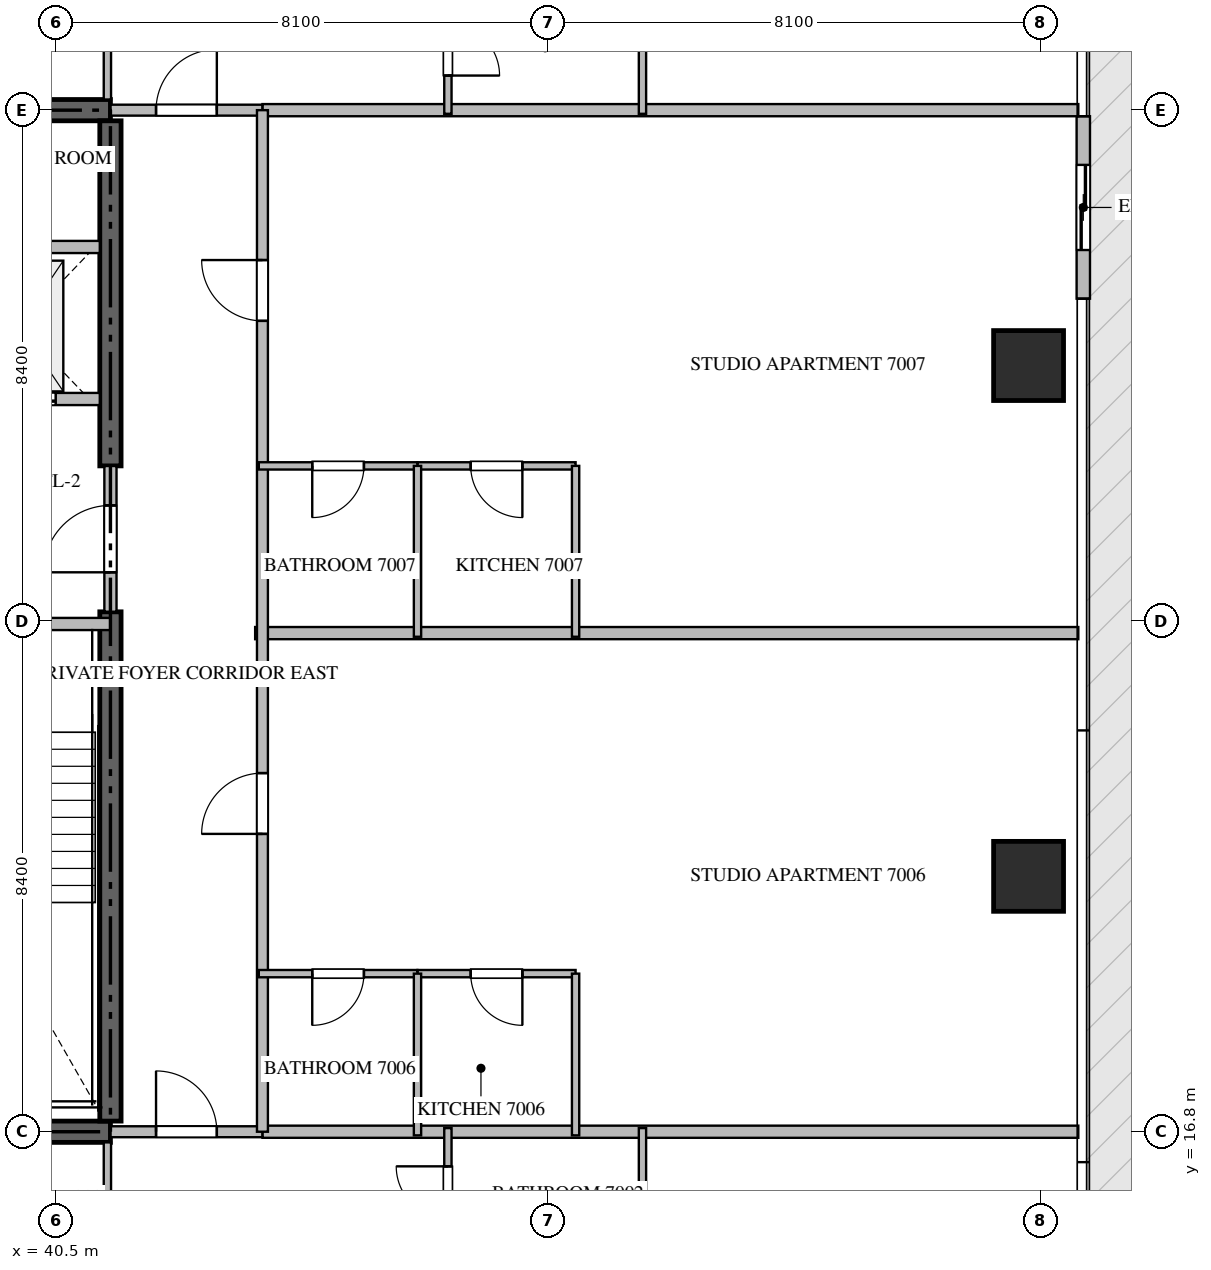
"""IFC4 building model, lengths in metres.
Left out: names, types, materials, properties, quantities, classifications, styles, units other than length and angle.
Written with IfcOpenShell. Run it as: python <this file> out.ifc"""

import sys

from ifc_helpers import new_model, si_unit, direction, frame, frame_2d, origin, origin_2d, place, context, subcontext, project, spatial, rectangle, extrude, source, transform, mapped, element, fill, save


model = new_model("IFC4")
c1 = context("Model", 3, precision=1e-05, world=origin(), true_north=direction((0.0, 1.0)))
c2 = subcontext(c1, "Body", "Model", "MODEL_VIEW")
j1 = project(units=[si_unit("LENGTHUNIT", "METRE"), si_unit("PLANEANGLEUNIT", "RADIAN")], contexts=[c1])
p1 = place(None, origin())
s1 = spatial("IfcSite", under=j1, at=p1, CompositionType="ELEMENT")
p2 = place(p1, origin())
s2 = spatial("IfcBuilding", under=s1, at=p2, CompositionType="ELEMENT")
p3 = place(p2, frame((0.0, 0.0, 279.75)))
s3 = spatial("IfcBuildingStorey", under=s2, at=p3, CompositionType="ELEMENT", Elevation=279.75)
for number, where, z_axis, x_axis in (
    (1, (23.4, 16.8, -0.26), (0.0, 0.0, 1.0), (1.0, 0.0, 0.0)),
    (2, (41.4, 33.6, -0.26), (0.0, 0.0, 1.0), (-1.0, 0.0, 0.0)),
):
    element("IfcWall", number, at=place(p3, frame(where, z_axis=z_axis, x_axis=x_axis)), inside=s3, PredefinedType="SHEAR", context=c2, shape_type="SweptSolid", body=[
        extrude(rectangle(XDim=18.0, YDim=0.35, at=frame_2d((9.0, 0.0))), origin(), (0.0, 0.0, 1.0), 3.848),
    ])
p4 = place(p3, frame((41.4, 16.975, -0.26), z_axis=(0.0, 0.0, 1.0), x_axis=(0.0, 1.0, 0.0)))
e3 = element("IfcWall", 3, at=p4, inside=s3, PredefinedType="SHEAR", context=c2, shape_type="SweptSolid", body=[
    extrude(rectangle(XDim=8.375, YDim=0.35, at=frame_2d((4.188, 0.0))), origin(), (0.0, 0.0, 1.0), 3.848),
])
p5 = place(p3, frame((41.4, 27.75, -0.26), z_axis=(0.0, 0.0, 1.0), x_axis=(0.0, 1.0, 0.0)))
e4 = element("IfcWall", 4, at=p5, inside=s3, PredefinedType="SHEAR", context=c2, shape_type="SweptSolid", body=[
    extrude(rectangle(XDim=5.675, YDim=0.35, at=frame_2d((2.837, 0.0))), origin(), (0.0, 0.0, 1.0), 3.848),
])
m1 = source(origin(), c2, "Body", "SweptSolid", [
    extrude(rectangle(XDim=1.15, YDim=1.15, at=origin_2d()), origin(), (0.0, 0.0, 1.0), 3.85),
])
for number, where, z_axis, x_axis in (
    (5, (56.5, 21.0, -0.26), (0.0, 0.0, 1.0), (1.0, 0.0, 0.0)),
    (6, (56.5, 29.4, -0.26), (0.0, 0.0, 1.0), (1.0, 0.0, 0.0)),
):
    element("IfcColumn", number, at=place(p3, frame(where, z_axis=z_axis, x_axis=x_axis)), inside=s3, PredefinedType="COLUMN", context=c2, shape_type="MappedRepresentation", body=[
        mapped(m1, transform((0.0, 0.0, 0.0), scale=1.0)),
    ])
p6 = place(p3, frame((57.4, 30.5, 0.0), z_axis=(0.0, 0.0, 1.0), x_axis=(0.0, 1.0, 0.0)))
e7 = element("IfcWall", 7, at=p6, inside=s3, PredefinedType="ELEMENTEDWALL", context=c2, shape_type="SweptSolid", body=[
    extrude(rectangle(XDim=3.0, YDim=0.22, at=frame_2d((1.5, 0.0))), origin(), (0.0, 0.0, 1.0), 3.575),
])
p7 = place(p6, frame((0.8, 0.0, 0.0)))
e8 = element("IfcOpeningElement", 8, at=p7, cuts=e7, PredefinedType="OPENING", context=c2, shape_type="SweptSolid", body=[
    extrude(rectangle(XDim=1.4, YDim=2.25, at=frame_2d((0.7, 1.125))), frame((0.0, 0.12, 0.0), z_axis=(0.0, -1.0, 0.0), x_axis=(1.0, 0.0, 0.0)), (0.0, 0.0, 1.0), 0.24),
])
p8 = place(p3, frame((36.95, 25.15, 0.0), z_axis=(0.0, 0.0, 1.0), x_axis=(1.0, 0.0, 0.0)))
e9 = element("IfcWall", 9, at=p8, inside=s3, PredefinedType="STANDARD", context=c2, shape_type="SweptSolid", body=[
    extrude(rectangle(XDim=4.45, YDim=0.2, at=frame_2d((2.225, 0.0))), origin(), (0.0, 0.0, 1.0), 3.59),
])
p9 = place(p8, frame((1.65, 0.0, 0.0)))
e10 = element("IfcOpeningElement", 10, at=p9, cuts=e9, PredefinedType="OPENING", context=c2, shape_type="SweptSolid", body=[
    extrude(rectangle(XDim=1.1, YDim=2.15, at=frame_2d((0.55, 1.075))), frame((0.0, 0.11, 0.0), z_axis=(0.0, -1.0, 0.0), x_axis=(1.0, 0.0, 0.0)), (0.0, 0.0, 1.0), 0.22),
])
p10 = place(p3, frame((38.75, 28.85, 0.0), z_axis=(0.0, 0.0, 1.0), x_axis=(1.0, 0.0, 0.0)))
e11 = element("IfcWall", 11, at=p10, inside=s3, PredefinedType="STANDARD", context=c2, shape_type="SweptSolid", body=[
    extrude(rectangle(XDim=2.475, YDim=0.2, at=frame_2d((1.238, 0.0))), origin(), (0.0, 0.0, 1.0), 3.59),
])
p11 = place(p10, frame((0.55, 0.0, 0.0)))
e12 = element("IfcOpeningElement", 12, at=p11, cuts=e11, PredefinedType="OPENING", context=c2, shape_type="SweptSolid", body=[
    extrude(rectangle(XDim=1.2, YDim=2.2, at=frame_2d((0.6, 1.1))), frame((0.0, 0.11, 0.0), z_axis=(0.0, -1.0, 0.0), x_axis=(1.0, 0.0, 0.0)), (0.0, 0.0, 1.0), 0.22),
])
p12 = place(p3, frame((38.75, 31.35, 0.0), z_axis=(0.0, 0.0, 1.0), x_axis=(1.0, 0.0, 0.0)))
e13 = element("IfcWall", 13, at=p12, inside=s3, PredefinedType="STANDARD", context=c2, shape_type="SweptSolid", body=[
    extrude(rectangle(XDim=2.475, YDim=0.2, at=frame_2d((1.238, 0.0))), origin(), (0.0, 0.0, 1.0), 3.59),
])
p13 = place(p3, frame((41.4, 25.352, 0.0), z_axis=(0.0, 0.0, 1.0), x_axis=(0.0, 1.0, 0.0)))
e14 = element("IfcWall", 14, at=p13, inside=s3, PredefinedType="STANDARD", context=c2, shape_type="SweptSolid", body=[
    extrude(rectangle(XDim=2.396, YDim=0.2, at=frame_2d((1.198, 0.0))), origin(), (0.0, 0.0, 1.0), 3.59),
])
p14 = place(p13, frame((0.648, 0.0, 0.0)))
e15 = element("IfcOpeningElement", 15, at=p14, cuts=e14, PredefinedType="OPENING", context=c2, shape_type="SweptSolid", body=[
    extrude(rectangle(XDim=1.1, YDim=2.15, at=frame_2d((0.55, 1.075))), frame((0.0, 0.11, 0.0), z_axis=(0.0, -1.0, 0.0), x_axis=(1.0, 0.0, 0.0)), (0.0, 0.0, 1.0), 0.22),
])
p15 = place(p3, frame((43.78, 25.0, 0.0), z_axis=(0.0, 0.0, 1.0), x_axis=(1.0, 0.0, 0.0)))
e16 = element("IfcWall", 16, at=p15, inside=s3, PredefinedType="PARTITIONING", context=c2, shape_type="SweptSolid", body=[
    extrude(rectangle(XDim=13.538, YDim=0.2, at=frame_2d((6.769, 0.0))), origin(), (0.0, 0.0, 1.0), 3.59),
])
for number, where, z_axis, x_axis in (
    (17, (43.9, 16.8, 0.0), (0.0, 0.0, 1.0), (1.0, 0.0, 0.0)),
    (18, (43.9, 33.6, 0.0), (0.0, 0.0, 1.0), (1.0, 0.0, 0.0)),
):
    element("IfcWall", number, at=place(p3, frame(where, z_axis=z_axis, x_axis=x_axis)), inside=s3, PredefinedType="PARTITIONING", context=c2, shape_type="SweptSolid", body=[
        extrude(rectangle(XDim=13.418, YDim=0.2, at=frame_2d((6.709, 0.0))), origin(), (0.0, 0.0, 1.0), 3.59),
    ])
p16 = place(p3, frame((41.402, 16.8, 0.0), z_axis=(0.0, 0.0, 1.0), x_axis=(1.0, 0.0, 0.0)))
e19 = element("IfcWall", 19, at=p16, inside=s3, PredefinedType="PARTITIONING", context=c2, shape_type="SweptSolid", body=[
    extrude(rectangle(XDim=2.496, YDim=0.18, at=frame_2d((1.248, 0.0))), origin(), (0.0, 0.0, 1.0), 3.59),
])
p17 = place(p16, frame((0.748, 0.0, 0.0)))
e20 = element("IfcOpeningElement", 20, at=p17, cuts=e19, PredefinedType="OPENING", context=c2, shape_type="SweptSolid", body=[
    extrude(rectangle(XDim=1.0, YDim=2.15, at=frame_2d((0.5, 1.075))), frame((0.0, 0.1, 0.0), z_axis=(0.0, -1.0, 0.0), x_axis=(1.0, 0.0, 0.0)), (0.0, 0.0, 1.0), 0.2),
])
p18 = place(p3, frame((41.402, 33.6, 0.0), z_axis=(0.0, 0.0, 1.0), x_axis=(1.0, 0.0, 0.0)))
e21 = element("IfcWall", 21, at=p18, inside=s3, PredefinedType="PARTITIONING", context=c2, shape_type="SweptSolid", body=[
    extrude(rectangle(XDim=2.496, YDim=0.18, at=frame_2d((1.248, 0.0))), origin(), (0.0, 0.0, 1.0), 3.59),
])
p19 = place(p18, frame((0.748, 0.0, 0.0)))
e22 = element("IfcOpeningElement", 22, at=p19, cuts=e21, PredefinedType="OPENING", context=c2, shape_type="SweptSolid", body=[
    extrude(rectangle(XDim=1.0, YDim=2.15, at=frame_2d((0.5, 1.075))), frame((0.0, 0.1, 0.0), z_axis=(0.0, -1.0, 0.0), x_axis=(1.0, 0.0, 0.0)), (0.0, 0.0, 1.0), 0.2),
])
p20 = place(p3, frame((43.9, 16.8, 0.0), z_axis=(0.0, 0.0, 1.0), x_axis=(0.0, 1.0, 0.0)))
e23 = element("IfcWall", 23, at=p20, inside=s3, PredefinedType="PARTITIONING", context=c2, shape_type="SweptSolid", body=[
    extrude(rectangle(XDim=16.8, YDim=0.18, at=frame_2d((8.4, 0.0))), origin(), (0.0, 0.0, 1.0), 3.59),
])
p21 = place(p20, frame((4.898, 0.0, 0.0)))
e24 = element("IfcOpeningElement", 24, at=p21, cuts=e23, PredefinedType="OPENING", context=c2, shape_type="SweptSolid", body=[
    extrude(rectangle(XDim=1.0, YDim=2.15, at=frame_2d((0.5, 1.075))), frame((0.0, 0.1, 0.0), z_axis=(0.0, -1.0, 0.0), x_axis=(1.0, 0.0, 0.0)), (0.0, 0.0, 1.0), 0.2),
])
p22 = place(p20, frame((13.335, 0.0, 0.0)))
e25 = element("IfcOpeningElement", 25, at=p22, cuts=e23, PredefinedType="OPENING", context=c2, shape_type="SweptSolid", body=[
    extrude(rectangle(XDim=1.0, YDim=2.15, at=frame_2d((0.5, 1.075))), frame((0.0, 0.1, 0.0), z_axis=(0.0, -1.0, 0.0), x_axis=(1.0, 0.0, 0.0)), (0.0, 0.0, 1.0), 0.2),
])
p23 = place(p3, frame((41.35, 14.05, 0.0), z_axis=(0.0, 0.0, 1.0), x_axis=(0.0, 1.0, 0.0)))
e26 = element("IfcWall", 26, at=p23, inside=s3, PredefinedType="PARTITIONING", context=c2, shape_type="SweptSolid", body=[
    extrude(rectangle(XDim=2.575, YDim=0.12, at=frame_2d((1.288, 0.0))), origin(), (0.0, 0.0, 1.0), 3.59),
])
p24 = place(p3, frame((50.15, 14.75, 0.0), z_axis=(0.0, 0.0, 1.0), x_axis=(0.0, 1.0, 0.0)))
e27 = element("IfcWall", 27, at=p24, inside=s3, PredefinedType="PARTITIONING", context=c2, shape_type="SweptSolid", body=[
    extrude(rectangle(XDim=2.11, YDim=0.12, at=frame_2d((1.055, 0.0))), origin(), (0.0, 0.0, 1.0), 3.59),
])
p25 = place(p3, frame((46.95, 14.752, 0.0), z_axis=(0.0, 0.0, 1.0), x_axis=(0.0, 1.0, 0.0)))
e28 = element("IfcWall", 28, at=p25, inside=s3, PredefinedType="PARTITIONING", context=c2, shape_type="SweptSolid", body=[
    extrude(rectangle(XDim=2.108, YDim=0.12, at=frame_2d((1.054, 0.0))), origin(), (0.0, 0.0, 1.0), 3.59),
])
p26 = place(p25, frame((0.629, 0.0, 0.0)))
e29 = element("IfcOpeningElement", 29, at=p26, cuts=e28, PredefinedType="OPENING", context=c2, shape_type="SweptSolid", body=[
    extrude(rectangle(XDim=0.85, YDim=2.1, at=frame_2d((0.425, 1.05))), frame((0.0, 0.07, 0.0), z_axis=(0.0, -1.0, 0.0), x_axis=(1.0, 0.0, 0.0)), (0.0, 0.0, 1.0), 0.14),
])
p27 = place(p3, frame((41.35, 36.35, 0.0), z_axis=(0.0, 0.0, 1.0), x_axis=(0.0, -1.0, 0.0)))
e30 = element("IfcWall", 30, at=p27, inside=s3, PredefinedType="PARTITIONING", context=c2, shape_type="SweptSolid", body=[
    extrude(rectangle(XDim=2.575, YDim=0.12, at=frame_2d((1.288, 0.0))), origin(), (0.0, 0.0, 1.0), 3.59),
])
p28 = place(p3, frame((50.15, 35.65, 0.0), z_axis=(0.0, 0.0, 1.0), x_axis=(0.0, -1.0, 0.0)))
e31 = element("IfcWall", 31, at=p28, inside=s3, PredefinedType="PARTITIONING", context=c2, shape_type="SweptSolid", body=[
    extrude(rectangle(XDim=2.11, YDim=0.12, at=frame_2d((1.055, 0.0))), origin(), (0.0, 0.0, 1.0), 3.59),
])
p29 = place(p3, frame((46.95, 35.648, 0.0), z_axis=(0.0, 0.0, 1.0), x_axis=(0.0, -1.0, 0.0)))
e32 = element("IfcWall", 32, at=p29, inside=s3, PredefinedType="PARTITIONING", context=c2, shape_type="SweptSolid", body=[
    extrude(rectangle(XDim=2.108, YDim=0.12, at=frame_2d((1.054, 0.0))), origin(), (0.0, 0.0, 1.0), 3.59),
])
p30 = place(p29, frame((0.629, 0.0, 0.0)))
e33 = element("IfcOpeningElement", 33, at=p30, cuts=e32, PredefinedType="OPENING", context=c2, shape_type="SweptSolid", body=[
    extrude(rectangle(XDim=0.85, YDim=2.1, at=frame_2d((0.425, 1.05))), frame((0.0, 0.07, 0.0), z_axis=(0.0, -1.0, 0.0), x_axis=(1.0, 0.0, 0.0)), (0.0, 0.0, 1.0), 0.14),
])
p31 = place(p3, frame((49.05, 19.4, 0.0), z_axis=(0.0, 0.0, 1.0), x_axis=(-1.0, 0.0, 0.0)))
e34 = element("IfcWall", 34, at=p31, inside=s3, PredefinedType="PARTITIONING", context=c2, shape_type="SweptSolid", body=[
    extrude(rectangle(XDim=2.6, YDim=0.12, at=frame_2d((1.3, 0.0))), origin(), (0.0, 0.0, 1.0), 3.59),
])
p32 = place(p31, frame((0.875, 0.0, 0.0)))
e35 = element("IfcOpeningElement", 35, at=p32, cuts=e34, PredefinedType="OPENING", context=c2, shape_type="SweptSolid", body=[
    extrude(rectangle(XDim=0.85, YDim=2.1, at=frame_2d((0.425, 1.05))), frame((0.0, 0.07, 0.0), z_axis=(0.0, -1.0, 0.0), x_axis=(1.0, 0.0, 0.0)), (0.0, 0.0, 1.0), 0.14),
])
p33 = place(p3, frame((46.448, 19.4, 0.0), z_axis=(0.0, 0.0, 1.0), x_axis=(-1.0, 0.0, 0.0)))
e36 = element("IfcWall", 36, at=p33, inside=s3, PredefinedType="PARTITIONING", context=c2, shape_type="SweptSolid", body=[
    extrude(rectangle(XDim=2.608, YDim=0.12, at=frame_2d((1.304, 0.0))), origin(), (0.0, 0.0, 1.0), 3.59),
])
p34 = place(p33, frame((0.879, 0.0, 0.0)))
e37 = element("IfcOpeningElement", 37, at=p34, cuts=e36, PredefinedType="OPENING", context=c2, shape_type="SweptSolid", body=[
    extrude(rectangle(XDim=0.85, YDim=2.1, at=frame_2d((0.425, 1.05))), frame((0.0, 0.07, 0.0), z_axis=(0.0, -1.0, 0.0), x_axis=(1.0, 0.0, 0.0)), (0.0, 0.0, 1.0), 0.14),
])
for number, where, z_axis, x_axis in (
    (38, (46.45, 16.74, 0.0), (0.0, 0.0, 1.0), (0.0, 1.0, 0.0)),
    (39, (49.05, 16.74, 0.0), (0.0, 0.0, 1.0), (0.0, 1.0, 0.0)),
):
    element("IfcWall", number, at=place(p3, frame(where, z_axis=z_axis, x_axis=x_axis)), inside=s3, PredefinedType="PARTITIONING", context=c2, shape_type="SweptSolid", body=[
        extrude(rectangle(XDim=2.66, YDim=0.12, at=frame_2d((1.33, 0.0))), origin(), (0.0, 0.0, 1.0), 3.59),
    ])
p35 = place(p3, frame((49.05, 27.75, 0.0), z_axis=(0.0, 0.0, 1.0), x_axis=(-1.0, 0.0, 0.0)))
e40 = element("IfcWall", 40, at=p35, inside=s3, PredefinedType="PARTITIONING", context=c2, shape_type="SweptSolid", body=[
    extrude(rectangle(XDim=2.6, YDim=0.12, at=frame_2d((1.3, 0.0))), origin(), (0.0, 0.0, 1.0), 3.59),
])
p36 = place(p35, frame((0.875, 0.0, 0.0)))
e41 = element("IfcOpeningElement", 41, at=p36, cuts=e40, PredefinedType="OPENING", context=c2, shape_type="SweptSolid", body=[
    extrude(rectangle(XDim=0.85, YDim=2.1, at=frame_2d((0.425, 1.05))), frame((0.0, 0.07, 0.0), z_axis=(0.0, -1.0, 0.0), x_axis=(1.0, 0.0, 0.0)), (0.0, 0.0, 1.0), 0.14),
])
p37 = place(p3, frame((46.448, 27.75, 0.0), z_axis=(0.0, 0.0, 1.0), x_axis=(-1.0, 0.0, 0.0)))
e42 = element("IfcWall", 42, at=p37, inside=s3, PredefinedType="PARTITIONING", context=c2, shape_type="SweptSolid", body=[
    extrude(rectangle(XDim=2.608, YDim=0.12, at=frame_2d((1.304, 0.0))), origin(), (0.0, 0.0, 1.0), 3.59),
])
p38 = place(p37, frame((0.879, 0.0, 0.0)))
e43 = element("IfcOpeningElement", 43, at=p38, cuts=e42, PredefinedType="OPENING", context=c2, shape_type="SweptSolid", body=[
    extrude(rectangle(XDim=0.85, YDim=2.1, at=frame_2d((0.425, 1.05))), frame((0.0, 0.07, 0.0), z_axis=(0.0, -1.0, 0.0), x_axis=(1.0, 0.0, 0.0)), (0.0, 0.0, 1.0), 0.14),
])
for number, where, z_axis, x_axis in (
    (44, (46.45, 24.94, 0.0), (0.0, 0.0, 1.0), (0.0, 1.0, 0.0)),
    (45, (49.05, 24.94, 0.0), (0.0, 0.0, 1.0), (0.0, 1.0, 0.0)),
):
    element("IfcWall", number, at=place(p3, frame(where, z_axis=z_axis, x_axis=x_axis)), inside=s3, PredefinedType="PARTITIONING", context=c2, shape_type="SweptSolid", body=[
        extrude(rectangle(XDim=2.81, YDim=0.12, at=frame_2d((1.405, 0.0))), origin(), (0.0, 0.0, 1.0), 3.59),
    ])
m2 = source(origin(), c2, "Body", "SweptSolid", [
    extrude(rectangle(XDim=1.4, YDim=2.25, at=frame_2d((0.7, 1.125))), frame((0.0, 0.025, 0.0), z_axis=(0.0, -1.0, 0.0), x_axis=(1.0, 0.0, 0.0)), (0.0, 0.0, 1.0), 0.05),
])
p39 = place(p7, origin())
e46 = element("IfcDoor", 46, at=p39, inside=s3, OperationType="SLIDING_TO_LEFT", PredefinedType="DOOR", context=c2, shape_type="MappedRepresentation", body=[
    mapped(m2, transform((0.0, 0.0, 0.0), scale=1.0)),
])
fill(e8, e46)
m3 = source(origin(), c2, "Body", "SweptSolid", [
    extrude(rectangle(XDim=1.2, YDim=2.2, at=frame_2d((0.6, 1.1))), frame((0.0, 0.025, 0.0), z_axis=(0.0, -1.0, 0.0), x_axis=(1.0, 0.0, 0.0)), (0.0, 0.0, 1.0), 0.05),
])
p40 = place(p11, origin())
e47 = element("IfcDoor", 47, at=p40, inside=s3, OperationType="DOUBLE_DOOR_SLIDING", PredefinedType="DOOR", context=c2, shape_type="MappedRepresentation", body=[
    mapped(m3, transform((0.0, 0.0, 0.0), scale=1.0)),
])
fill(e12, e47)
m4 = source(origin(), c2, "Body", "SweptSolid", [
    extrude(rectangle(XDim=1.1, YDim=2.15, at=frame_2d((0.55, 1.075))), frame((0.0, 0.025, 0.0), z_axis=(0.0, -1.0, 0.0), x_axis=(1.0, 0.0, 0.0)), (0.0, 0.0, 1.0), 0.05),
])
p41 = place(p14, origin())
e48 = element("IfcDoor", 48, at=p41, inside=s3, OperationType="SINGLE_SWING_LEFT", PredefinedType="DOOR", context=c2, shape_type="MappedRepresentation", body=[
    mapped(m4, transform((0.0, 0.0, 0.0), scale=1.0)),
])
fill(e15, e48)
m5 = source(origin(), c2, "Body", "SweptSolid", [
    extrude(rectangle(XDim=1.0, YDim=2.15, at=frame_2d((0.5, 1.075))), frame((0.0, 0.025, 0.0), z_axis=(0.0, -1.0, 0.0), x_axis=(1.0, 0.0, 0.0)), (0.0, 0.0, 1.0), 0.05),
])
p42 = place(p17, origin())
e49 = element("IfcDoor", 49, at=p42, inside=s3, OperationType="SINGLE_SWING_LEFT", PredefinedType="DOOR", context=c2, shape_type="MappedRepresentation", body=[
    mapped(m5, transform((0.0, 0.0, 0.0), scale=1.0)),
])
fill(e20, e49)
p43 = place(p19, origin())
e50 = element("IfcDoor", 50, at=p43, inside=s3, OperationType="SINGLE_SWING_RIGHT", PredefinedType="DOOR", context=c2, shape_type="MappedRepresentation", body=[
    mapped(m5, transform((0.0, 0.0, 0.0), scale=1.0)),
])
fill(e22, e50)
p44 = place(p21, origin())
e51 = element("IfcDoor", 51, at=p44, inside=s3, OperationType="SINGLE_SWING_LEFT", PredefinedType="DOOR", context=c2, shape_type="MappedRepresentation", body=[
    mapped(m5, transform((0.0, 0.0, 0.0), scale=1.0)),
])
fill(e24, e51)
p45 = place(p22, origin())
e52 = element("IfcDoor", 52, at=p45, inside=s3, OperationType="SINGLE_SWING_RIGHT", PredefinedType="DOOR", context=c2, shape_type="MappedRepresentation", body=[
    mapped(m5, transform((0.0, 0.0, 0.0), scale=1.0)),
])
fill(e25, e52)
m6 = source(origin(), c2, "Body", "SweptSolid", [
    extrude(rectangle(XDim=0.85, YDim=2.1, at=frame_2d((0.425, 1.05))), frame((0.0, 0.025, 0.0), z_axis=(0.0, -1.0, 0.0), x_axis=(1.0, 0.0, 0.0)), (0.0, 0.0, 1.0), 0.05),
])
p46 = place(p26, origin())
e53 = element("IfcDoor", 53, at=p46, inside=s3, OperationType="SINGLE_SWING_RIGHT", PredefinedType="DOOR", context=c2, shape_type="MappedRepresentation", body=[
    mapped(m6, transform((0.0, 0.0, 0.0), scale=1.0)),
])
fill(e29, e53)
p47 = place(p30, origin())
e54 = element("IfcDoor", 54, at=p47, inside=s3, OperationType="SINGLE_SWING_RIGHT", PredefinedType="DOOR", context=c2, shape_type="MappedRepresentation", body=[
    mapped(m6, transform((0.0, 0.0, 0.0), scale=1.0)),
])
fill(e33, e54)
p48 = place(p32, origin())
e55 = element("IfcDoor", 55, at=p48, inside=s3, OperationType="SINGLE_SWING_LEFT", PredefinedType="DOOR", context=c2, shape_type="MappedRepresentation", body=[
    mapped(m6, transform((0.0, 0.0, 0.0), scale=1.0)),
])
fill(e35, e55)
p49 = place(p34, origin())
e56 = element("IfcDoor", 56, at=p49, inside=s3, OperationType="SINGLE_SWING_RIGHT", PredefinedType="DOOR", context=c2, shape_type="MappedRepresentation", body=[
    mapped(m6, transform((0.0, 0.0, 0.0), scale=1.0)),
])
fill(e37, e56)
p50 = place(p36, origin())
e57 = element("IfcDoor", 57, at=p50, inside=s3, OperationType="SINGLE_SWING_LEFT", PredefinedType="DOOR", context=c2, shape_type="MappedRepresentation", body=[
    mapped(m6, transform((0.0, 0.0, 0.0), scale=1.0)),
])
fill(e41, e57)
p51 = place(p38, origin())
e58 = element("IfcDoor", 58, at=p51, inside=s3, OperationType="SINGLE_SWING_RIGHT", PredefinedType="DOOR", context=c2, shape_type="MappedRepresentation", body=[
    mapped(m6, transform((0.0, 0.0, 0.0), scale=1.0)),
])
fill(e43, e58)
save(model, sys.argv[1])
